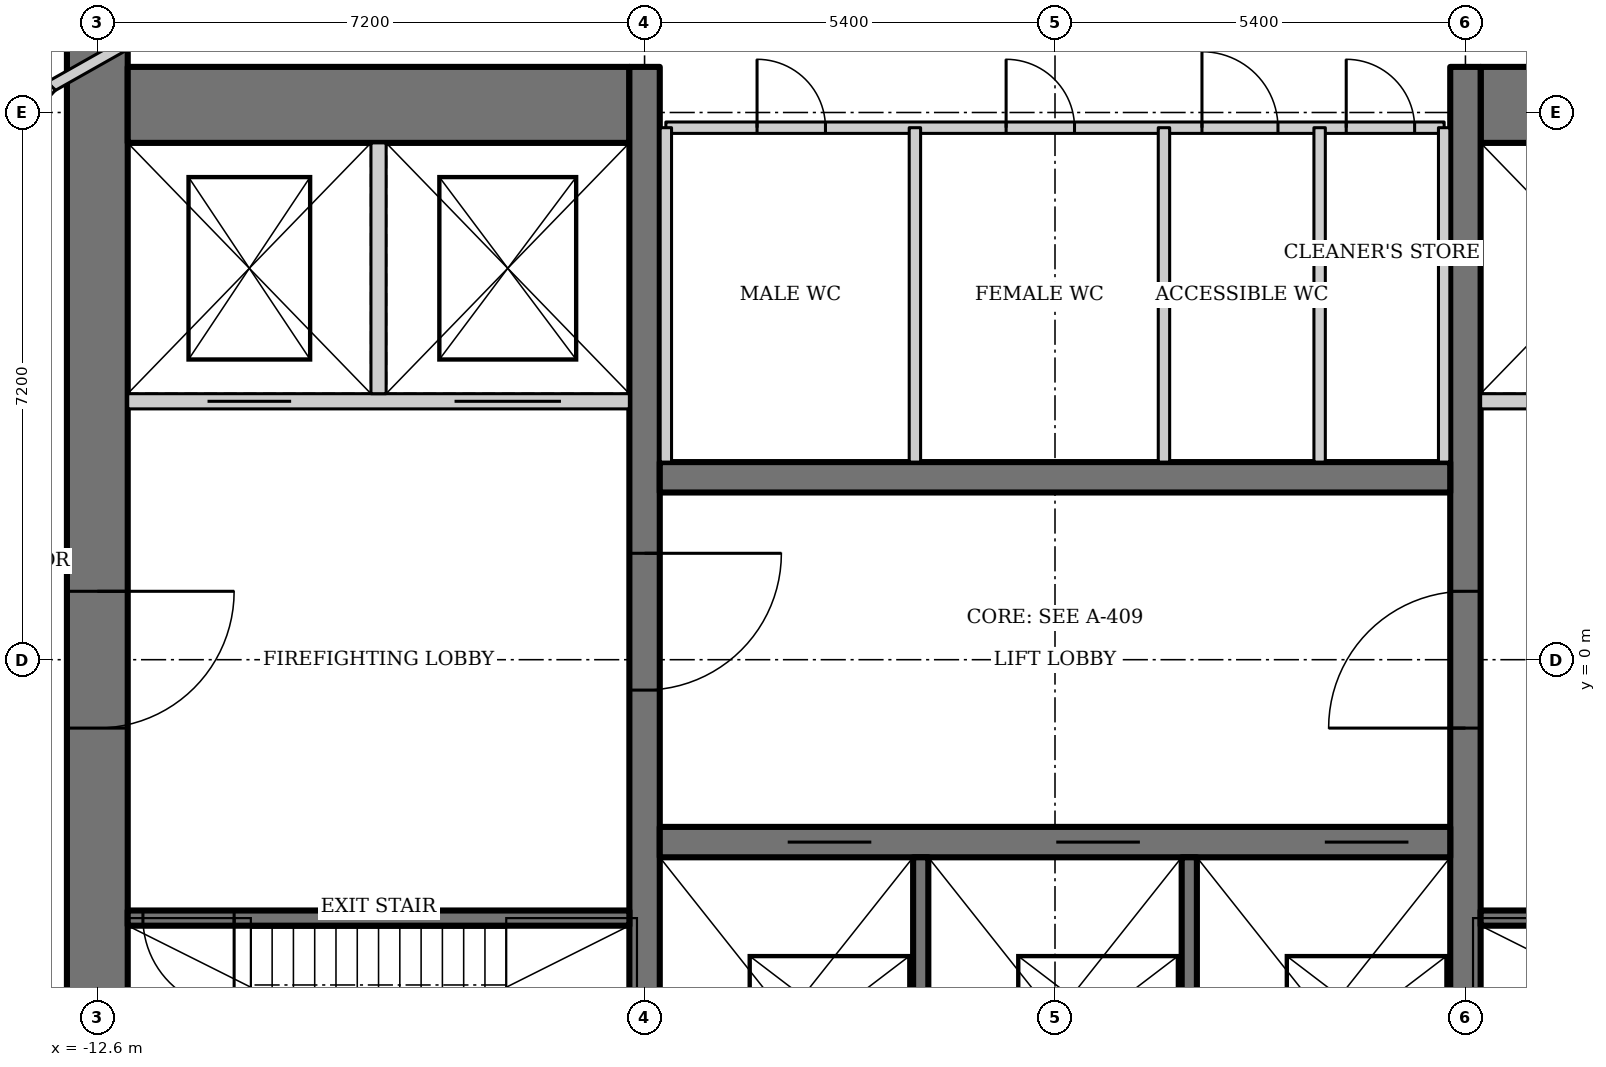
"""IFC4 building model, lengths in metres.
Left out: names, types, materials, properties, quantities, classifications, styles, units other than length and angle.
Written with IfcOpenShell. Run it as: python <this file> out.ifc"""

import sys

from ifc_helpers import new_model, si_unit, direction, frame, frame_2d, origin, place, context, subcontext, project, spatial, rectangle, extrude, element, fill, save


model = new_model("IFC4")
c1 = context("Model", 3, precision=1e-05, world=origin(), true_north=direction((0.0, 1.0)))
c2 = subcontext(c1, "Body", "Model", "MODEL_VIEW")
j1 = project(units=[si_unit("LENGTHUNIT", "METRE"), si_unit("PLANEANGLEUNIT", "RADIAN")], contexts=[c1])
p1 = place(None, origin())
s1 = spatial("IfcSite", under=j1, at=p1, CompositionType="ELEMENT")
p2 = place(p1, origin())
s2 = spatial("IfcBuilding", under=s1, at=p2, CompositionType="ELEMENT")
p3 = place(p2, frame((0.0, 0.0, 270.4)))
s3 = spatial("IfcBuildingStorey", under=s2, at=p3, CompositionType="ELEMENT", Elevation=270.4)
p4 = place(p3, frame((-12.6, 11.0, 0.0), z_axis=(0.0, 0.0, 1.0), x_axis=(0.0, -1.0, 0.0)))
e1 = element("IfcWall", 1, at=p4, inside=s3, PredefinedType="SHEAR", context=c2, shape_type="SweptSolid", body=[
    extrude(rectangle(XDim=22.0, YDim=0.8, at=frame_2d((11.0, 0.0))), origin(), (0.0, 0.0, 1.0), 4.5),
])
p5 = place(p4, frame((10.1, 0.0, 0.0)))
e2 = element("IfcOpeningElement", 2, at=p5, cuts=e1, PredefinedType="OPENING", context=c2, shape_type="SweptSolid", body=[
    extrude(rectangle(XDim=1.8, YDim=2.1, at=frame_2d((0.9, 1.05))), frame((0.0, 0.41, 0.0), z_axis=(0.0, -1.0, 0.0), x_axis=(1.0, 0.0, 0.0)), (0.0, 0.0, 1.0), 0.82),
])
for number, where, z_axis, x_axis in (
    (3, (12.2, 7.3, 0.0), (0.0, 0.0, 1.0), (-1.0, 0.0, 0.0)),
    (4, (-5.6, 7.3, 0.0), (0.0, 0.0, 1.0), (-1.0, 0.0, 0.0)),
):
    element("IfcWall", number, at=place(p3, frame(where, z_axis=z_axis, x_axis=x_axis)), inside=s3, PredefinedType="SHEAR", context=c2, shape_type="SweptSolid", body=[
        extrude(rectangle(XDim=6.6, YDim=1.0, at=frame_2d((3.3, 0.0))), origin(), (0.0, 0.0, 1.0), 4.5),
    ])
p6 = place(p3, frame((5.4, -6.8, 0.0), z_axis=(0.0, 0.0, 1.0), x_axis=(0.0, 1.0, 0.0)))
e5 = element("IfcWall", 5, at=p6, inside=s3, PredefinedType="SHEAR", context=c2, shape_type="SweptSolid", body=[
    extrude(rectangle(XDim=14.6, YDim=0.4, at=frame_2d((7.3, 0.0))), origin(), (0.0, 0.0, 1.0), 4.5),
])
p7 = place(p6, frame((5.9, 0.0, 0.0)))
e6 = element("IfcOpeningElement", 6, at=p7, cuts=e5, PredefinedType="OPENING", context=c2, shape_type="SweptSolid", body=[
    extrude(rectangle(XDim=1.8, YDim=2.1, at=frame_2d((0.9, 1.05))), frame((0.0, 0.21, 0.0), z_axis=(0.0, -1.0, 0.0), x_axis=(1.0, 0.0, 0.0)), (0.0, 0.0, 1.0), 0.42),
])
p8 = place(p3, frame((-5.4, 7.8, 0.0), z_axis=(0.0, 0.0, 1.0), x_axis=(0.0, -1.0, 0.0)))
e7 = element("IfcWall", 7, at=p8, inside=s3, PredefinedType="SHEAR", context=c2, shape_type="SweptSolid", body=[
    extrude(rectangle(XDim=14.6, YDim=0.4, at=frame_2d((7.3, 0.0))), origin(), (0.0, 0.0, 1.0), 4.5),
])
p9 = place(p8, frame((6.4, 0.0, 0.0)))
e8 = element("IfcOpeningElement", 8, at=p9, cuts=e7, PredefinedType="OPENING", context=c2, shape_type="SweptSolid", body=[
    extrude(rectangle(XDim=1.8, YDim=2.1, at=frame_2d((0.9, 1.05))), frame((0.0, 0.21, 0.0), z_axis=(0.0, -1.0, 0.0), x_axis=(1.0, 0.0, 0.0)), (0.0, 0.0, 1.0), 0.42),
])
p10 = place(p3, frame((-5.2, -2.4, 0.0), z_axis=(0.0, 0.0, 1.0), x_axis=(1.0, 0.0, 0.0)))
e9 = element("IfcWall", 9, at=p10, inside=s3, PredefinedType="SHEAR", context=c2, shape_type="SweptSolid", body=[
    extrude(rectangle(XDim=10.4, YDim=0.4, at=frame_2d((5.2, 0.0))), origin(), (0.0, 0.0, 1.0), 4.5),
])
p11 = place(p10, frame((1.683, 0.0, 0.0)))
e10 = element("IfcOpeningElement", 10, at=p11, cuts=e9, PredefinedType="OPENING", context=c2, shape_type="SweptSolid", body=[
    extrude(rectangle(XDim=1.1, YDim=2.2, at=frame_2d((0.55, 1.1))), frame((0.0, 0.21, 0.0), z_axis=(0.0, -1.0, 0.0), x_axis=(1.0, 0.0, 0.0)), (0.0, 0.0, 1.0), 0.42),
])
p12 = place(p10, frame((5.217, 0.0, 0.0)))
e11 = element("IfcOpeningElement", 11, at=p12, cuts=e9, PredefinedType="OPENING", context=c2, shape_type="SweptSolid", body=[
    extrude(rectangle(XDim=1.1, YDim=2.2, at=frame_2d((0.55, 1.1))), frame((0.0, 0.21, 0.0), z_axis=(0.0, -1.0, 0.0), x_axis=(1.0, 0.0, 0.0)), (0.0, 0.0, 1.0), 0.42),
])
p13 = place(p10, frame((8.75, 0.0, 0.0)))
e12 = element("IfcOpeningElement", 12, at=p13, cuts=e9, PredefinedType="OPENING", context=c2, shape_type="SweptSolid", body=[
    extrude(rectangle(XDim=1.1, YDim=2.2, at=frame_2d((0.55, 1.1))), frame((0.0, 0.21, 0.0), z_axis=(0.0, -1.0, 0.0), x_axis=(1.0, 0.0, 0.0)), (0.0, 0.0, 1.0), 0.42),
])
for number, where, z_axis, x_axis in (
    (13, (-1.767, -2.6, 0.0), (0.0, 0.0, 1.0), (0.0, -1.0, 0.0)),
    (14, (1.767, -2.6, 0.0), (0.0, 0.0, 1.0), (0.0, -1.0, 0.0)),
):
    element("IfcWall", number, at=place(p3, frame(where, z_axis=z_axis, x_axis=x_axis)), inside=s3, PredefinedType="SOLIDWALL", context=c2, shape_type="SweptSolid", body=[
        extrude(rectangle(XDim=4.2, YDim=0.2, at=frame_2d((2.1, 0.0))), origin(), (0.0, 0.0, 1.0), 4.5),
    ])
p14 = place(p3, frame((5.2, 2.4, 0.0), z_axis=(0.0, 0.0, 1.0), x_axis=(-1.0, 0.0, 0.0)))
e15 = element("IfcWall", 15, at=p14, inside=s3, PredefinedType="SHEAR", context=c2, shape_type="SweptSolid", body=[
    extrude(rectangle(XDim=10.4, YDim=0.4, at=frame_2d((5.2, 0.0))), origin(), (0.0, 0.0, 1.0), 4.5),
])
p15 = place(p3, frame((5.6, -3.4, 0.0), z_axis=(0.0, 0.0, 1.0), x_axis=(1.0, 0.0, 0.0)))
e16 = element("IfcWall", 16, at=p15, inside=s3, PredefinedType="SHEAR", context=c2, shape_type="SweptSolid", body=[
    extrude(rectangle(XDim=6.6, YDim=0.2, at=frame_2d((3.3, 0.0))), origin(), (0.0, 0.0, 1.0), 4.5),
])
p16 = place(p15, frame((5.2, 0.0, 0.0)))
e17 = element("IfcOpeningElement", 17, at=p16, cuts=e16, PredefinedType="OPENING", context=c2, shape_type="SweptSolid", body=[
    extrude(rectangle(XDim=1.2, YDim=2.1, at=frame_2d((0.6, 1.05))), frame((0.0, 0.11, 0.0), z_axis=(0.0, -1.0, 0.0), x_axis=(1.0, 0.0, 0.0)), (0.0, 0.0, 1.0), 0.22),
])
p17 = place(p3, frame((12.2, 3.4, 0.0), z_axis=(0.0, 0.0, 1.0), x_axis=(-1.0, 0.0, 0.0)))
e18 = element("IfcWall", 18, at=p17, inside=s3, PredefinedType="SOLIDWALL", context=c2, shape_type="SweptSolid", body=[
    extrude(rectangle(XDim=6.6, YDim=0.2, at=frame_2d((3.3, 0.0))), origin(), (0.0, 0.0, 1.0), 4.5),
])
p18 = place(p17, frame((4.45, 0.0, 0.0)))
e19 = element("IfcOpeningElement", 19, at=p18, cuts=e18, PredefinedType="OPENING", context=c2, shape_type="SweptSolid", body=[
    extrude(rectangle(XDim=1.1, YDim=2.2, at=frame_2d((0.55, 1.1))), frame((0.0, 0.11, 0.0), z_axis=(0.0, -1.0, 0.0), x_axis=(1.0, 0.0, 0.0)), (0.0, 0.0, 1.0), 0.22),
])
p19 = place(p17, frame((0.9, 0.0, 0.0)))
e20 = element("IfcOpeningElement", 20, at=p19, cuts=e18, PredefinedType="OPENING", context=c2, shape_type="SweptSolid", body=[
    extrude(rectangle(XDim=1.4, YDim=2.2, at=frame_2d((0.7, 1.1))), frame((0.0, 0.11, 0.0), z_axis=(0.0, -1.0, 0.0), x_axis=(1.0, 0.0, 0.0)), (0.0, 0.0, 1.0), 0.22),
])
p20 = place(p3, frame((-5.6, -3.4, 0.0), z_axis=(0.0, 0.0, 1.0), x_axis=(-1.0, 0.0, 0.0)))
e21 = element("IfcWall", 21, at=p20, inside=s3, PredefinedType="SHEAR", context=c2, shape_type="SweptSolid", body=[
    extrude(rectangle(XDim=6.6, YDim=0.2, at=frame_2d((3.3, 0.0))), origin(), (0.0, 0.0, 1.0), 4.5),
])
p21 = place(p20, frame((5.2, 0.0, 0.0)))
e22 = element("IfcOpeningElement", 22, at=p21, cuts=e21, PredefinedType="OPENING", context=c2, shape_type="SweptSolid", body=[
    extrude(rectangle(XDim=1.2, YDim=2.1, at=frame_2d((0.6, 1.05))), frame((0.0, 0.11, 0.0), z_axis=(0.0, -1.0, 0.0), x_axis=(1.0, 0.0, 0.0)), (0.0, 0.0, 1.0), 0.22),
])
p22 = place(p3, frame((-12.2, 3.4, 0.0), z_axis=(0.0, 0.0, 1.0), x_axis=(1.0, 0.0, 0.0)))
e23 = element("IfcWall", 23, at=p22, inside=s3, PredefinedType="SOLIDWALL", context=c2, shape_type="SweptSolid", body=[
    extrude(rectangle(XDim=6.6, YDim=0.2, at=frame_2d((3.3, 0.0))), origin(), (0.0, 0.0, 1.0), 4.5),
])
p23 = place(p22, frame((1.05, 0.0, 0.0)))
e24 = element("IfcOpeningElement", 24, at=p23, cuts=e23, PredefinedType="OPENING", context=c2, shape_type="SweptSolid", body=[
    extrude(rectangle(XDim=1.1, YDim=2.2, at=frame_2d((0.55, 1.1))), frame((0.0, 0.11, 0.0), z_axis=(0.0, -1.0, 0.0), x_axis=(1.0, 0.0, 0.0)), (0.0, 0.0, 1.0), 0.22),
])
p24 = place(p22, frame((4.3, 0.0, 0.0)))
e25 = element("IfcOpeningElement", 25, at=p24, cuts=e23, PredefinedType="OPENING", context=c2, shape_type="SweptSolid", body=[
    extrude(rectangle(XDim=1.4, YDim=2.2, at=frame_2d((0.7, 1.1))), frame((0.0, 0.11, 0.0), z_axis=(0.0, -1.0, 0.0), x_axis=(1.0, 0.0, 0.0)), (0.0, 0.0, 1.0), 0.22),
])
p25 = place(p3, frame((-8.9, 3.5, 0.0), z_axis=(0.0, 0.0, 1.0), x_axis=(0.0, 1.0, 0.0)))
e26 = element("IfcWall", 26, at=p25, inside=s3, PredefinedType="SOLIDWALL", context=c2, shape_type="SweptSolid", body=[
    extrude(rectangle(XDim=3.3, YDim=0.2, at=frame_2d((1.65, 0.0))), origin(), (0.0, 0.0, 1.0), 4.5),
])
p26 = place(p3, frame((-19.959, 11.355, 0.0), z_axis=(0.0, 0.0, 1.0), x_axis=(0.871035125561, -0.491220734537, 0.0)))
e27 = element("IfcWall", 27, at=p26, inside=s3, PredefinedType="PARTITIONING", context=c2, shape_type="SweptSolid", body=[
    extrude(rectangle(XDim=7.753, YDim=0.1, at=frame_2d((3.877, 0.0))), origin(), (0.0, 0.0, 1.0), 3.824),
])
p27 = place(p3, frame((-9.377, 9.71, 0.0), z_axis=(0.0, 0.0, 1.0), x_axis=(-0.870593853694, -0.492002379984, 0.0)))
e28 = element("IfcWall", 28, at=p27, inside=s3, PredefinedType="PARTITIONING", context=c2, shape_type="SweptSolid", body=[
    extrude(rectangle(XDim=4.398, YDim=0.15, at=frame_2d((2.199, 0.0))), origin(), (0.0, 0.0, 1.0), 4.35),
])
p28 = place(p27, frame((0.15, 0.0, 0.0)))
e29 = element("IfcOpeningElement", 29, at=p28, cuts=e28, PredefinedType="OPENING", context=c2, shape_type="SweptSolid", body=[
    extrude(rectangle(XDim=0.9, YDim=2.1, at=frame_2d((0.45, 1.05))), frame((0.0, 0.085, 0.0), z_axis=(0.0, -1.0, 0.0), x_axis=(1.0, 0.0, 0.0)), (0.0, 0.0, 1.0), 0.17),
])
p29 = place(p3, frame((-13.206, 7.546, 0.0), z_axis=(0.0, 0.0, 1.0), x_axis=(-0.67323765707, -0.739426167445, 0.0)))
e30 = element("IfcWall", 30, at=p29, inside=s3, PredefinedType="PARTITIONING", context=c2, shape_type="SweptSolid", body=[
    extrude(rectangle(XDim=4.688, YDim=0.15, at=frame_2d((2.344, 0.0))), origin(), (0.0, 0.0, 1.0), 4.35),
])
p30 = place(p3, frame((-16.362, -4.08, 0.0), z_axis=(0.0, 0.0, 1.0), x_axis=(0.67323765707, -0.739426167445, 0.0)))
e31 = element("IfcWall", 31, at=p30, inside=s3, PredefinedType="PARTITIONING", context=c2, shape_type="SweptSolid", body=[
    extrude(rectangle(XDim=4.688, YDim=0.15, at=frame_2d((2.344, 0.0))), origin(), (0.0, 0.0, 1.0), 4.35),
])
p31 = place(p30, frame((0.15, 0.0, 0.0)))
e32 = element("IfcOpeningElement", 32, at=p31, cuts=e31, PredefinedType="OPENING", context=c2, shape_type="SweptSolid", body=[
    extrude(rectangle(XDim=0.9, YDim=2.1, at=frame_2d((0.45, 1.05))), frame((0.0, 0.085, 0.0), z_axis=(0.0, -1.0, 0.0), x_axis=(1.0, 0.0, 0.0)), (0.0, 0.0, 1.0), 0.17),
])
p32 = place(p3, frame((-5.12, 7.0, 0.0), z_axis=(0.0, 0.0, 1.0), x_axis=(1.0, 0.0, 0.0)))
e33 = element("IfcWall", 33, at=p32, inside=s3, PredefinedType="SOLIDWALL", context=c2, shape_type="SweptSolid", body=[
    extrude(rectangle(XDim=10.24, YDim=0.15, at=frame_2d((5.12, 0.0))), origin(), (0.0, 0.0, 1.0), 4.35),
])
p33 = place(p32, frame((1.2, 0.0, 0.0)))
e34 = element("IfcOpeningElement", 34, at=p33, cuts=e33, PredefinedType="OPENING", context=c2, shape_type="SweptSolid", body=[
    extrude(rectangle(XDim=0.9, YDim=2.1, at=frame_2d((0.45, 1.05))), frame((0.0, 0.085, 0.0), z_axis=(0.0, -1.0, 0.0), x_axis=(1.0, 0.0, 0.0)), (0.0, 0.0, 1.0), 0.17),
])
p34 = place(p32, frame((4.477, 0.0, 0.0)))
e35 = element("IfcOpeningElement", 35, at=p34, cuts=e33, PredefinedType="OPENING", context=c2, shape_type="SweptSolid", body=[
    extrude(rectangle(XDim=0.9, YDim=2.1, at=frame_2d((0.45, 1.05))), frame((0.0, 0.085, 0.0), z_axis=(0.0, -1.0, 0.0), x_axis=(1.0, 0.0, 0.0)), (0.0, 0.0, 1.0), 0.17),
])
p35 = place(p32, frame((7.054, 0.0, 0.0)))
e36 = element("IfcOpeningElement", 36, at=p35, cuts=e33, PredefinedType="OPENING", context=c2, shape_type="SweptSolid", body=[
    extrude(rectangle(XDim=1.0, YDim=2.1, at=frame_2d((0.5, 1.05))), frame((0.0, 0.085, 0.0), z_axis=(0.0, -1.0, 0.0), x_axis=(1.0, 0.0, 0.0)), (0.0, 0.0, 1.0), 0.17),
])
p36 = place(p32, frame((8.952, 0.0, 0.0)))
e37 = element("IfcOpeningElement", 37, at=p36, cuts=e33, PredefinedType="OPENING", context=c2, shape_type="SweptSolid", body=[
    extrude(rectangle(XDim=0.9, YDim=2.1, at=frame_2d((0.45, 1.05))), frame((0.0, 0.085, 0.0), z_axis=(0.0, -1.0, 0.0), x_axis=(1.0, 0.0, 0.0)), (0.0, 0.0, 1.0), 0.17),
])
for number, where, z_axis, x_axis in (
    (38, (-5.12, 2.6, 0.0), (0.0, 0.0, 1.0), (0.0, 1.0, 0.0)),
    (39, (5.12, 2.6, 0.0), (0.0, 0.0, 1.0), (0.0, 1.0, 0.0)),
    (40, (-1.843, 2.6, 0.0), (0.0, 0.0, 1.0), (0.0, 1.0, 0.0)),
):
    element("IfcWall", number, at=place(p3, frame(where, z_axis=z_axis, x_axis=x_axis)), inside=s3, PredefinedType="SOLIDWALL", context=c2, shape_type="SweptSolid", body=[
        extrude(rectangle(XDim=4.4, YDim=0.15, at=frame_2d((2.2, 0.0))), origin(), (0.0, 0.0, 1.0), 4.35),
    ])
p37 = place(p3, frame((1.434, 2.6, 0.0), z_axis=(0.0, 0.0, 1.0), x_axis=(0.0, 1.0, 0.0)))
e41 = element("IfcWall", 41, at=p37, inside=s3, PredefinedType="SOLIDWALL", context=c2, shape_type="SweptSolid", body=[
    extrude(rectangle(XDim=4.4, YDim=0.15, at=frame_2d((2.2, 0.0))), origin(), (0.0, 0.0, 1.0), 3.408),
])
p38 = place(p3, frame((3.482, 2.6, 0.0), z_axis=(0.0, 0.0, 1.0), x_axis=(0.0, 1.0, 0.0)))
e42 = element("IfcWall", 42, at=p38, inside=s3, PredefinedType="SOLIDWALL", context=c2, shape_type="SweptSolid", body=[
    extrude(rectangle(XDim=4.4, YDim=0.15, at=frame_2d((2.2, 0.0))), origin(), (0.0, 0.0, 1.0), 4.35),
])
p39 = place(p7, origin())
e43 = element("IfcDoor", 43, at=p39, inside=s3, OperationType="DOUBLE_DOOR_DOUBLE_SWING", PredefinedType="DOOR", context=c2, shape_type="SweptSolid", body=[
    extrude(rectangle(XDim=1.8, YDim=2.1, at=frame_2d((0.9, 1.05))), frame((0.0, 0.025, 0.0), z_axis=(0.0, -1.0, 0.0), x_axis=(1.0, 0.0, 0.0)), (0.0, 0.0, 1.0), 0.05),
])
fill(e6, e43)
p40 = place(p9, origin())
e44 = element("IfcDoor", 44, at=p40, inside=s3, OperationType="DOUBLE_DOOR_DOUBLE_SWING", PredefinedType="DOOR", context=c2, shape_type="SweptSolid", body=[
    extrude(rectangle(XDim=1.8, YDim=2.1, at=frame_2d((0.9, 1.05))), frame((0.0, 0.025, 0.0), z_axis=(0.0, -1.0, 0.0), x_axis=(1.0, 0.0, 0.0)), (0.0, 0.0, 1.0), 0.05),
])
fill(e8, e44)
p41 = place(p21, origin())
e45 = element("IfcDoor", 45, at=p41, inside=s3, OperationType="SINGLE_SWING_RIGHT", PredefinedType="DOOR", context=c2, shape_type="SweptSolid", body=[
    extrude(rectangle(XDim=1.2, YDim=2.1, at=frame_2d((0.6, 1.05))), frame((0.0, 0.025, 0.0), z_axis=(0.0, -1.0, 0.0), x_axis=(1.0, 0.0, 0.0)), (0.0, 0.0, 1.0), 0.05),
])
fill(e22, e45)
p42 = place(p5, origin())
e46 = element("IfcDoor", 46, at=p42, inside=s3, OperationType="DOUBLE_DOOR_DOUBLE_SWING", PredefinedType="DOOR", context=c2, shape_type="SweptSolid", body=[
    extrude(rectangle(XDim=1.8, YDim=2.1, at=frame_2d((0.9, 1.05))), frame((0.0, 0.025, 0.0), z_axis=(0.0, -1.0, 0.0), x_axis=(1.0, 0.0, 0.0)), (0.0, 0.0, 1.0), 0.05),
])
fill(e2, e46)
p43 = place(p11, origin())
e47 = element("IfcDoor", 47, at=p43, inside=s3, OperationType="DOUBLE_DOOR_SLIDING", PredefinedType="DOOR", context=c2, shape_type="SweptSolid", body=[
    extrude(rectangle(XDim=1.1, YDim=2.2, at=frame_2d((0.55, 1.1))), frame((0.0, 0.025, 0.0), z_axis=(0.0, -1.0, 0.0), x_axis=(1.0, 0.0, 0.0)), (0.0, 0.0, 1.0), 0.05),
])
fill(e10, e47)
p44 = place(p12, origin())
e48 = element("IfcDoor", 48, at=p44, inside=s3, OperationType="DOUBLE_DOOR_SLIDING", PredefinedType="DOOR", context=c2, shape_type="SweptSolid", body=[
    extrude(rectangle(XDim=1.1, YDim=2.2, at=frame_2d((0.55, 1.1))), frame((0.0, 0.025, 0.0), z_axis=(0.0, -1.0, 0.0), x_axis=(1.0, 0.0, 0.0)), (0.0, 0.0, 1.0), 0.05),
])
fill(e11, e48)
p45 = place(p13, origin())
e49 = element("IfcDoor", 49, at=p45, inside=s3, OperationType="DOUBLE_DOOR_SLIDING", PredefinedType="DOOR", context=c2, shape_type="SweptSolid", body=[
    extrude(rectangle(XDim=1.1, YDim=2.2, at=frame_2d((0.55, 1.1))), frame((0.0, 0.025, 0.0), z_axis=(0.0, -1.0, 0.0), x_axis=(1.0, 0.0, 0.0)), (0.0, 0.0, 1.0), 0.05),
])
fill(e12, e49)
p46 = place(p23, origin())
e50 = element("IfcDoor", 50, at=p46, inside=s3, OperationType="DOUBLE_DOOR_SLIDING", PredefinedType="DOOR", context=c2, shape_type="SweptSolid", body=[
    extrude(rectangle(XDim=1.1, YDim=2.2, at=frame_2d((0.55, 1.1))), frame((0.0, 0.025, 0.0), z_axis=(0.0, -1.0, 0.0), x_axis=(1.0, 0.0, 0.0)), (0.0, 0.0, 1.0), 0.05),
])
fill(e24, e50)
p47 = place(p24, origin())
e51 = element("IfcDoor", 51, at=p47, inside=s3, OperationType="DOUBLE_DOOR_SLIDING", PredefinedType="DOOR", context=c2, shape_type="SweptSolid", body=[
    extrude(rectangle(XDim=1.4, YDim=2.2, at=frame_2d((0.7, 1.1))), frame((0.0, 0.025, 0.0), z_axis=(0.0, -1.0, 0.0), x_axis=(1.0, 0.0, 0.0)), (0.0, 0.0, 1.0), 0.05),
])
fill(e25, e51)
p48 = place(p33, origin())
e52 = element("IfcDoor", 52, at=p48, inside=s3, OperationType="SINGLE_SWING_LEFT", PredefinedType="DOOR", context=c2, shape_type="SweptSolid", body=[
    extrude(rectangle(XDim=0.9, YDim=2.1, at=frame_2d((0.45, 1.05))), frame((0.0, 0.025, 0.0), z_axis=(0.0, -1.0, 0.0), x_axis=(1.0, 0.0, 0.0)), (0.0, 0.0, 1.0), 0.05),
])
fill(e34, e52)
p49 = place(p34, origin())
e53 = element("IfcDoor", 53, at=p49, inside=s3, OperationType="SINGLE_SWING_LEFT", PredefinedType="DOOR", context=c2, shape_type="SweptSolid", body=[
    extrude(rectangle(XDim=0.9, YDim=2.1, at=frame_2d((0.45, 1.05))), frame((0.0, 0.025, 0.0), z_axis=(0.0, -1.0, 0.0), x_axis=(1.0, 0.0, 0.0)), (0.0, 0.0, 1.0), 0.05),
])
fill(e35, e53)
p50 = place(p35, origin())
e54 = element("IfcDoor", 54, at=p50, inside=s3, OperationType="SINGLE_SWING_LEFT", PredefinedType="DOOR", context=c2, shape_type="SweptSolid", body=[
    extrude(rectangle(XDim=1.0, YDim=2.1, at=frame_2d((0.5, 1.05))), frame((0.0, 0.025, 0.0), z_axis=(0.0, -1.0, 0.0), x_axis=(1.0, 0.0, 0.0)), (0.0, 0.0, 1.0), 0.05),
])
fill(e36, e54)
p51 = place(p36, origin())
e55 = element("IfcDoor", 55, at=p51, inside=s3, OperationType="SINGLE_SWING_LEFT", PredefinedType="DOOR", context=c2, shape_type="SweptSolid", body=[
    extrude(rectangle(XDim=0.9, YDim=2.1, at=frame_2d((0.45, 1.05))), frame((0.0, 0.025, 0.0), z_axis=(0.0, -1.0, 0.0), x_axis=(1.0, 0.0, 0.0)), (0.0, 0.0, 1.0), 0.05),
])
fill(e37, e55)
save(model, sys.argv[1])
